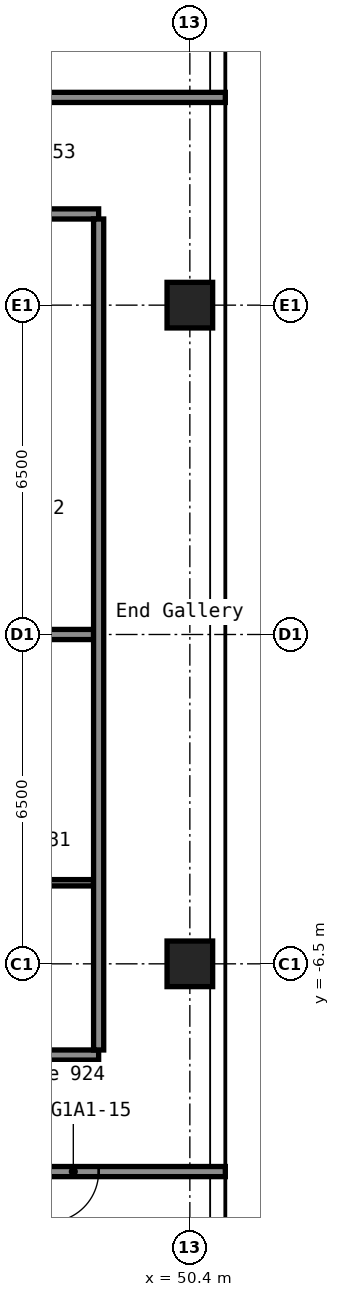
"""IFC4 building model, lengths in metres.
Left out: names, types, materials, properties, quantities, classifications, styles, units other than length and angle.
Written with IfcOpenShell. Run it as: python <this file> out.ifc"""

import sys

from ifc_helpers import new_model, si_unit, direction, frame, frame_2d, origin, origin_2d, place, context, subcontext, project, spatial, rectangle, hollow_rectangle, extrude, element, fill, save


model = new_model("IFC4")
c1 = context("Model", 3, precision=1e-05, world=origin(), true_north=direction((0.0, 1.0)))
c2 = subcontext(c1, "Body", "Model", "MODEL_VIEW")
j1 = project(units=[si_unit("LENGTHUNIT", "METRE"), si_unit("PLANEANGLEUNIT", "RADIAN")], contexts=[c1])
p1 = place(None, origin())
s1 = spatial("IfcSite", under=j1, at=p1, CompositionType="ELEMENT")
p2 = place(p1, origin())
s2 = spatial("IfcBuilding", under=s1, at=p2, CompositionType="ELEMENT")
p3 = place(p2, frame((0.0, 0.0, 35.8)))
s3 = spatial("IfcBuildingStorey", under=s2, at=p3, CompositionType="ELEMENT", Elevation=35.8)
for number, where, z_axis, x_axis in (
    (1, (50.4, -6.5, 0.0), (0.0, 0.0, 1.0), (1.0, 0.0, 0.0)),
    (2, (50.4, 6.5, 0.0), (0.0, 0.0, 1.0), (1.0, 0.0, 0.0)),
):
    element("IfcColumn", number, at=place(p3, frame(where, z_axis=z_axis, x_axis=x_axis)), inside=s3, PredefinedType="COLUMN", context=c2, shape_type="SweptSolid", body=[
        extrude(hollow_rectangle(XDim=0.9, YDim=0.9, WallThickness=0.036, at=origin_2d()), origin(), (0.0, 0.0, 1.0), 2.8),
    ])
p4 = place(p3, frame((16.8, -10.6, 0.0), z_axis=(0.0, 0.0, 1.0), x_axis=(1.0, 0.0, 0.0)))
e3 = element("IfcWall", 3, at=p4, inside=s3, PredefinedType="PARTITIONING", context=c2, shape_type="SweptSolid", body=[
    extrude(rectangle(XDim=34.3, YDim=0.2, at=frame_2d((17.15, 0.0))), origin(), (0.0, 0.0, 1.0), 2.8),
])
p5 = place(p4, frame((5.4, 0.0, 0.0)))
e4 = element("IfcOpeningElement", 4, at=p5, cuts=e3, PredefinedType="OPENING", context=c2, shape_type="SweptSolid", body=[
    extrude(rectangle(XDim=1.0, YDim=2.1, at=frame_2d((0.5, 1.05))), frame((0.0, 0.11, 0.0), z_axis=(0.0, -1.0, 0.0), x_axis=(1.0, 0.0, 0.0)), (0.0, 0.0, 1.0), 0.22),
])
p6 = place(p4, frame((13.8, 0.0, 0.0)))
e5 = element("IfcOpeningElement", 5, at=p6, cuts=e3, PredefinedType="OPENING", context=c2, shape_type="SweptSolid", body=[
    extrude(rectangle(XDim=1.0, YDim=2.1, at=frame_2d((0.5, 1.05))), frame((0.0, 0.11, 0.0), z_axis=(0.0, -1.0, 0.0), x_axis=(1.0, 0.0, 0.0)), (0.0, 0.0, 1.0), 0.22),
])
p7 = place(p4, frame((18.8, 0.0, 0.0)))
e6 = element("IfcOpeningElement", 6, at=p7, cuts=e3, PredefinedType="OPENING", context=c2, shape_type="SweptSolid", body=[
    extrude(rectangle(XDim=1.0, YDim=2.1, at=frame_2d((0.5, 1.05))), frame((0.0, 0.11, 0.0), z_axis=(0.0, -1.0, 0.0), x_axis=(1.0, 0.0, 0.0)), (0.0, 0.0, 1.0), 0.22),
])
p8 = place(p4, frame((30.8, 0.0, 0.0)))
e7 = element("IfcOpeningElement", 7, at=p8, cuts=e3, PredefinedType="OPENING", context=c2, shape_type="SweptSolid", body=[
    extrude(rectangle(XDim=1.0, YDim=2.1, at=frame_2d((0.5, 1.05))), frame((0.0, 0.11, 0.0), z_axis=(0.0, -1.0, 0.0), x_axis=(1.0, 0.0, 0.0)), (0.0, 0.0, 1.0), 0.22),
])
p9 = place(p3, frame((33.6, -8.3, 0.0), z_axis=(0.0, 0.0, 1.0), x_axis=(1.0, 0.0, 0.0)))
e8 = element("IfcWall", 8, at=p9, inside=s3, PredefinedType="PARTITIONING", context=c2, shape_type="SweptSolid", body=[
    extrude(rectangle(XDim=15.0, YDim=0.2, at=frame_2d((7.5, 0.0))), origin(), (0.0, 0.0, 1.0), 2.8),
])
p10 = place(p9, frame((5.8, 0.0, 0.0)))
e9 = element("IfcOpeningElement", 9, at=p10, cuts=e8, PredefinedType="OPENING", context=c2, shape_type="SweptSolid", body=[
    extrude(rectangle(XDim=1.0, YDim=2.1, at=frame_2d((0.5, 1.05))), frame((0.0, 0.11, 0.0), z_axis=(0.0, -1.0, 0.0), x_axis=(1.0, 0.0, 0.0)), (0.0, 0.0, 1.0), 0.22),
])
p11 = place(p9, frame((9.5, 0.0, 0.0)))
e10 = element("IfcOpeningElement", 10, at=p11, cuts=e8, PredefinedType="OPENING", context=c2, shape_type="SweptSolid", body=[
    extrude(rectangle(XDim=1.0, YDim=2.1, at=frame_2d((0.5, 1.05))), frame((0.0, 0.11, 0.0), z_axis=(0.0, -1.0, 0.0), x_axis=(1.0, 0.0, 0.0)), (0.0, 0.0, 1.0), 0.22),
])
p12 = place(p3, frame((45.262, -4.9, 0.0), z_axis=(0.0, 0.0, 1.0), x_axis=(1.0, 0.0, 0.0)))
e11 = element("IfcWall", 11, at=p12, inside=s3, PredefinedType="PARTITIONING", context=c2, shape_type="SweptSolid", body=[
    extrude(rectangle(XDim=3.238, YDim=0.125, at=frame_2d((1.619, 0.0))), origin(), (0.0, 0.0, 1.0), 2.8),
])
p13 = place(p12, frame((1.238, 0.0, 0.0)))
e12 = element("IfcOpeningElement", 12, at=p13, cuts=e11, PredefinedType="OPENING", context=c2, shape_type="SweptSolid", body=[
    extrude(rectangle(XDim=0.8, YDim=2.1, at=frame_2d((0.4, 1.05))), frame((0.0, 0.073, 0.0), z_axis=(0.0, -1.0, 0.0), x_axis=(1.0, 0.0, 0.0)), (0.0, 0.0, 1.0), 0.145),
])
p14 = place(p3, frame((33.6, 0.0, 0.0), z_axis=(0.0, 0.0, 1.0), x_axis=(1.0, 0.0, 0.0)))
e13 = element("IfcWall", 13, at=p14, inside=s3, PredefinedType="PARTITIONING", context=c2, shape_type="SweptSolid", body=[
    extrude(rectangle(XDim=14.9, YDim=0.2, at=frame_2d((7.45, 0.0))), origin(), (0.0, 0.0, 1.0), 2.8),
])
p15 = place(p3, frame((33.6, 8.3, 0.0), z_axis=(0.0, 0.0, 1.0), x_axis=(1.0, 0.0, 0.0)))
e14 = element("IfcWall", 14, at=p15, inside=s3, PredefinedType="PARTITIONING", context=c2, shape_type="SweptSolid", body=[
    extrude(rectangle(XDim=15.0, YDim=0.2, at=frame_2d((7.5, 0.0))), origin(), (0.0, 0.0, 1.0), 2.8),
])
p16 = place(p15, frame((5.4, 0.0, 0.0)))
e15 = element("IfcOpeningElement", 15, at=p16, cuts=e14, PredefinedType="OPENING", context=c2, shape_type="SweptSolid", body=[
    extrude(rectangle(XDim=1.0, YDim=2.1, at=frame_2d((0.5, 1.05))), frame((0.0, 0.11, 0.0), z_axis=(0.0, -1.0, 0.0), x_axis=(1.0, 0.0, 0.0)), (0.0, 0.0, 1.0), 0.22),
])
p17 = place(p15, frame((12.9, 0.0, 0.0)))
e16 = element("IfcOpeningElement", 16, at=p17, cuts=e14, PredefinedType="OPENING", context=c2, shape_type="SweptSolid", body=[
    extrude(rectangle(XDim=1.0, YDim=2.1, at=frame_2d((0.5, 1.05))), frame((0.0, 0.11, 0.0), z_axis=(0.0, -1.0, 0.0), x_axis=(1.0, 0.0, 0.0)), (0.0, 0.0, 1.0), 0.22),
])
p18 = place(p3, frame((16.8, 10.6, 0.0), z_axis=(0.0, 0.0, 1.0), x_axis=(1.0, 0.0, 0.0)))
e17 = element("IfcWall", 17, at=p18, inside=s3, PredefinedType="PARTITIONING", context=c2, shape_type="SweptSolid", body=[
    extrude(rectangle(XDim=34.3, YDim=0.2, at=frame_2d((17.15, 0.0))), origin(), (0.0, 0.0, 1.0), 2.8),
])
p19 = place(p18, frame((5.4, 0.0, 0.0)))
e18 = element("IfcOpeningElement", 18, at=p19, cuts=e17, PredefinedType="OPENING", context=c2, shape_type="SweptSolid", body=[
    extrude(rectangle(XDim=1.0, YDim=2.1, at=frame_2d((0.5, 1.05))), frame((0.0, 0.11, 0.0), z_axis=(0.0, -1.0, 0.0), x_axis=(1.0, 0.0, 0.0)), (0.0, 0.0, 1.0), 0.22),
])
p20 = place(p18, frame((10.4, 0.0, 0.0)))
e19 = element("IfcOpeningElement", 19, at=p20, cuts=e17, PredefinedType="OPENING", context=c2, shape_type="SweptSolid", body=[
    extrude(rectangle(XDim=1.0, YDim=2.1, at=frame_2d((0.5, 1.05))), frame((0.0, 0.11, 0.0), z_axis=(0.0, -1.0, 0.0), x_axis=(1.0, 0.0, 0.0)), (0.0, 0.0, 1.0), 0.22),
])
p21 = place(p18, frame((22.2, 0.0, 0.0)))
e20 = element("IfcOpeningElement", 20, at=p21, cuts=e17, PredefinedType="OPENING", context=c2, shape_type="SweptSolid", body=[
    extrude(rectangle(XDim=1.0, YDim=2.1, at=frame_2d((0.5, 1.05))), frame((0.0, 0.11, 0.0), z_axis=(0.0, -1.0, 0.0), x_axis=(1.0, 0.0, 0.0)), (0.0, 0.0, 1.0), 0.22),
])
p22 = place(p18, frame((27.4, 0.0, 0.0)))
e21 = element("IfcOpeningElement", 21, at=p22, cuts=e17, PredefinedType="OPENING", context=c2, shape_type="SweptSolid", body=[
    extrude(rectangle(XDim=1.0, YDim=2.1, at=frame_2d((0.5, 1.05))), frame((0.0, 0.11, 0.0), z_axis=(0.0, -1.0, 0.0), x_axis=(1.0, 0.0, 0.0)), (0.0, 0.0, 1.0), 0.22),
])
p23 = place(p3, frame((48.6, -8.2, 0.0), z_axis=(0.0, 0.0, 1.0), x_axis=(0.0, 1.0, 0.0)))
e22 = element("IfcWall", 22, at=p23, inside=s3, PredefinedType="PARTITIONING", context=c2, shape_type="SweptSolid", body=[
    extrude(rectangle(XDim=16.4, YDim=0.2, at=frame_2d((8.2, 0.0))), origin(), (0.0, 0.0, 1.0), 2.8),
])
p24 = place(p8, origin())
e23 = element("IfcDoor", 23, at=p24, inside=s3, OperationType="SINGLE_SWING_LEFT", PredefinedType="DOOR", context=c2, shape_type="SweptSolid", body=[
    extrude(rectangle(XDim=1.0, YDim=2.1, at=frame_2d((0.5, 1.05))), frame((0.0, 0.025, 0.0), z_axis=(0.0, -1.0, 0.0), x_axis=(1.0, 0.0, 0.0)), (0.0, 0.0, 1.0), 0.05),
])
fill(e7, e23)
save(model, sys.argv[1])
